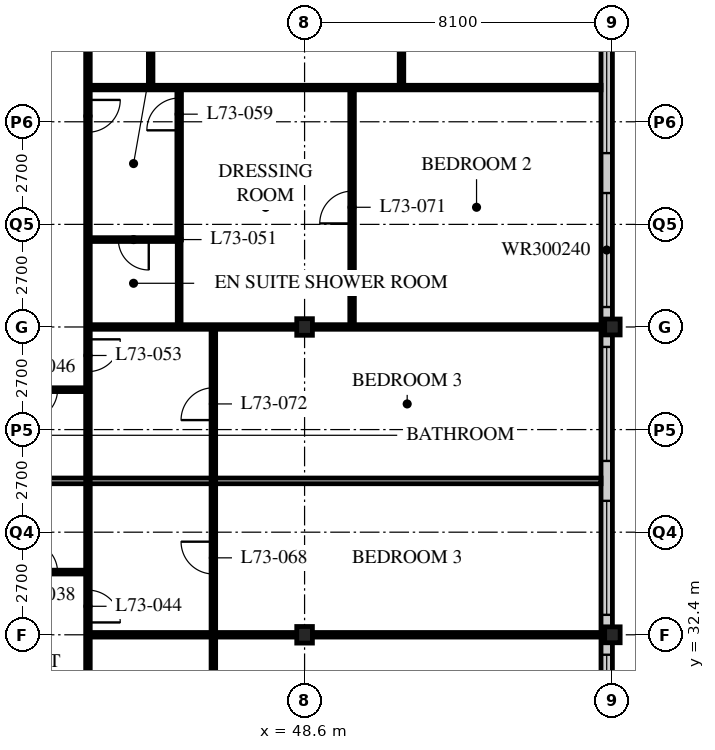
"""IFC4 building model, lengths in metres.
Left out: names, types, materials, properties, quantities, classifications, styles, units other than length and angle.
Written with IfcOpenShell. Run it as: python <this file> out.ifc"""

import sys

from ifc_helpers import new_model, si_unit, direction, frame, frame_2d, origin, origin_2d, place, context, subcontext, project, spatial, rectangle, i_section, extrude, element, fill, save


model = new_model("IFC4")
c1 = context("Model", 3, precision=1e-05, world=origin(), true_north=direction((0.0, 1.0)))
c2 = subcontext(c1, "Body", "Model", "MODEL_VIEW")
j1 = project(units=[si_unit("LENGTHUNIT", "METRE"), si_unit("PLANEANGLEUNIT", "RADIAN")], contexts=[c1])
p1 = place(None, origin())
s1 = spatial("IfcSite", under=j1, at=p1, CompositionType="ELEMENT")
p2 = place(p1, origin())
s2 = spatial("IfcBuilding", under=s1, at=p2, CompositionType="ELEMENT")
p3 = place(p2, frame((0.0, 0.0, 285.3)))
s3 = spatial("IfcBuildingStorey", under=s2, at=p3, CompositionType="ELEMENT", Elevation=285.3)
for number, where, z_axis, x_axis in (
    (1, (48.6, 32.4, 0.0), (0.0, 0.0, 1.0), (1.0, 0.0, 0.0)),
    (2, (48.6, 40.5, 0.0), (0.0, 0.0, 1.0), (1.0, 0.0, 0.0)),
):
    element("IfcColumn", number, at=place(p3, frame(where, z_axis=z_axis, x_axis=x_axis)), inside=s3, PredefinedType="COLUMN", context=c2, shape_type="SweptSolid", body=[
        extrude(i_section(OverallWidth=0.412, OverallDepth=0.437, WebThickness=0.036, FlangeThickness=0.058, FilletRadius=0.015, at=origin_2d()), origin(), (0.0, 0.0, 1.0), 3.9),
    ])
for number, where, z_axis, x_axis in (
    (3, (56.7, 32.4, 0.0), (0.0, 0.0, 1.0), (1.0, 0.0, 0.0)),
    (4, (56.7, 40.5, 0.0), (0.0, 0.0, 1.0), (1.0, 0.0, 0.0)),
):
    element("IfcColumn", number, at=place(p3, frame(where, z_axis=z_axis, x_axis=x_axis)), inside=s3, PredefinedType="COLUMN", context=c2, shape_type="SweptSolid", body=[
        extrude(i_section(OverallWidth=0.407, OverallDepth=0.419, WebThickness=0.031, FlangeThickness=0.049, FilletRadius=0.015, at=origin_2d()), origin(), (0.0, 0.0, 1.0), 3.9),
    ])
p4 = place(p3, frame((56.55, 24.6, 0.0), z_axis=(0.0, 0.0, 1.0), x_axis=(0.0, 1.0, 0.0)))
e5 = element("IfcWall", 5, at=p4, inside=s3, PredefinedType="SOLIDWALL", context=c2, shape_type="SweptSolid", body=[
    extrude(rectangle(XDim=32.1, YDim=0.3, at=frame_2d((16.05, 0.0))), origin(), (0.0, 0.0, 1.0), 3.69),
])
p5 = place(p4, frame((0.225, 0.0, 0.6)))
e6 = element("IfcOpeningElement", 6, at=p5, cuts=e5, PredefinedType="OPENING", context=c2, shape_type="SweptSolid", body=[
    extrude(rectangle(XDim=3.0, YDim=2.4, at=frame_2d((1.5, 1.2))), frame((0.0, 0.16, 0.0), z_axis=(0.0, -1.0, 0.0), x_axis=(1.0, 0.0, 0.0)), (0.0, 0.0, 1.0), 0.32),
])
p6 = place(p4, frame((4.275, 0.0, 0.6)))
e7 = element("IfcOpeningElement", 7, at=p6, cuts=e5, PredefinedType="OPENING", context=c2, shape_type="SweptSolid", body=[
    extrude(rectangle(XDim=3.0, YDim=2.4, at=frame_2d((1.5, 1.2))), frame((0.0, 0.16, 0.0), z_axis=(0.0, -1.0, 0.0), x_axis=(1.0, 0.0, 0.0)), (0.0, 0.0, 1.0), 0.32),
])
p7 = place(p4, frame((8.325, 0.0, 0.6)))
e8 = element("IfcOpeningElement", 8, at=p7, cuts=e5, PredefinedType="OPENING", context=c2, shape_type="SweptSolid", body=[
    extrude(rectangle(XDim=3.0, YDim=2.4, at=frame_2d((1.5, 1.2))), frame((0.0, 0.16, 0.0), z_axis=(0.0, -1.0, 0.0), x_axis=(1.0, 0.0, 0.0)), (0.0, 0.0, 1.0), 0.32),
])
p8 = place(p4, frame((12.375, 0.0, 0.6)))
e9 = element("IfcOpeningElement", 9, at=p8, cuts=e5, PredefinedType="OPENING", context=c2, shape_type="SweptSolid", body=[
    extrude(rectangle(XDim=3.0, YDim=2.4, at=frame_2d((1.5, 1.2))), frame((0.0, 0.16, 0.0), z_axis=(0.0, -1.0, 0.0), x_axis=(1.0, 0.0, 0.0)), (0.0, 0.0, 1.0), 0.32),
])
p9 = place(p4, frame((16.425, 0.0, 0.6)))
e10 = element("IfcOpeningElement", 10, at=p9, cuts=e5, PredefinedType="OPENING", context=c2, shape_type="SweptSolid", body=[
    extrude(rectangle(XDim=3.0, YDim=2.4, at=frame_2d((1.5, 1.2))), frame((0.0, 0.16, 0.0), z_axis=(0.0, -1.0, 0.0), x_axis=(1.0, 0.0, 0.0)), (0.0, 0.0, 1.0), 0.32),
])
p10 = place(p4, frame((20.475, 0.0, 0.6)))
e11 = element("IfcOpeningElement", 11, at=p10, cuts=e5, PredefinedType="OPENING", context=c2, shape_type="SweptSolid", body=[
    extrude(rectangle(XDim=3.0, YDim=2.4, at=frame_2d((1.5, 1.2))), frame((0.0, 0.16, 0.0), z_axis=(0.0, -1.0, 0.0), x_axis=(1.0, 0.0, 0.0)), (0.0, 0.0, 1.0), 0.32),
])
p11 = place(p4, frame((24.525, 0.0, 0.6)))
e12 = element("IfcOpeningElement", 12, at=p11, cuts=e5, PredefinedType="OPENING", context=c2, shape_type="SweptSolid", body=[
    extrude(rectangle(XDim=3.0, YDim=2.4, at=frame_2d((1.5, 1.2))), frame((0.0, 0.16, 0.0), z_axis=(0.0, -1.0, 0.0), x_axis=(1.0, 0.0, 0.0)), (0.0, 0.0, 1.0), 0.32),
])
p12 = place(p4, frame((28.575, 0.0, 0.6)))
e13 = element("IfcOpeningElement", 13, at=p12, cuts=e5, PredefinedType="OPENING", context=c2, shape_type="SweptSolid", body=[
    extrude(rectangle(XDim=3.0, YDim=2.4, at=frame_2d((1.5, 1.2))), frame((0.0, 0.16, 0.0), z_axis=(0.0, -1.0, 0.0), x_axis=(1.0, 0.0, 0.0)), (0.0, 0.0, 1.0), 0.32),
])
p13 = place(p3, frame((40.5, 34.05, 0.0), z_axis=(0.0, 0.0, 1.0), x_axis=(1.0, 0.0, 0.0)))
e14 = element("IfcWall", 14, at=p13, inside=s3, PredefinedType="PARTITIONING", context=c2, shape_type="SweptSolid", body=[
    extrude(rectangle(XDim=2.4, YDim=0.1, at=frame_2d((1.2, 0.0))), origin(), (0.0, 0.0, 1.0), 3.69),
])
p14 = place(p13, frame((0.8, 0.0, 0.0)))
e15 = element("IfcOpeningElement", 15, at=p14, cuts=e14, PredefinedType="OPENING", context=c2, shape_type="SweptSolid", body=[
    extrude(rectangle(XDim=0.8, YDim=2.1, at=frame_2d((0.4, 1.05))), frame((0.0, 0.06, 0.0), z_axis=(0.0, -1.0, 0.0), x_axis=(1.0, 0.0, 0.0)), (0.0, 0.0, 1.0), 0.12),
])
p15 = place(p3, frame((42.9, 22.5, 0.0), z_axis=(0.0, 0.0, 1.0), x_axis=(0.0, 1.0, 0.0)))
e16 = element("IfcWall", 16, at=p15, inside=s3, PredefinedType="PARTITIONING", context=c2, shape_type="SweptSolid", body=[
    extrude(rectangle(XDim=13.95, YDim=0.12, at=frame_2d((6.975, 0.0))), origin(), (0.0, 0.0, 1.0), 3.69),
])
p16 = place(p15, frame((2.125, 0.0, 0.0)))
e17 = element("IfcOpeningElement", 17, at=p16, cuts=e16, PredefinedType="OPENING", context=c2, shape_type="SweptSolid", body=[
    extrude(rectangle(XDim=0.85, YDim=2.1, at=frame_2d((0.425, 1.05))), frame((0.0, 0.07, 0.0), z_axis=(0.0, -1.0, 0.0), x_axis=(1.0, 0.0, 0.0)), (0.0, 0.0, 1.0), 0.14),
])
p17 = place(p15, frame((6.175, 0.0, 0.0)))
e18 = element("IfcOpeningElement", 18, at=p17, cuts=e16, PredefinedType="OPENING", context=c2, shape_type="SweptSolid", body=[
    extrude(rectangle(XDim=0.85, YDim=2.1, at=frame_2d((0.425, 1.05))), frame((0.0, 0.07, 0.0), z_axis=(0.0, -1.0, 0.0), x_axis=(1.0, 0.0, 0.0)), (0.0, 0.0, 1.0), 0.14),
])
p18 = place(p15, frame((10.225, 0.0, 0.0)))
e19 = element("IfcOpeningElement", 19, at=p18, cuts=e16, PredefinedType="OPENING", context=c2, shape_type="SweptSolid", body=[
    extrude(rectangle(XDim=0.85, YDim=2.1, at=frame_2d((0.425, 1.05))), frame((0.0, 0.07, 0.0), z_axis=(0.0, -1.0, 0.0), x_axis=(1.0, 0.0, 0.0)), (0.0, 0.0, 1.0), 0.14),
])
p19 = place(p3, frame((40.5, 36.45, 0.0), z_axis=(0.0, 0.0, 1.0), x_axis=(1.0, 0.0, 0.0)))
e20 = element("IfcWall", 20, at=p19, inside=s3, PredefinedType="PARTITIONING", context=c2, shape_type="SweptSolid", body=[
    extrude(rectangle(XDim=15.9, YDim=0.15, at=frame_2d((7.95, 0.0))), origin(), (0.0, 0.0, 1.0), 3.69),
])
p20 = place(p3, frame((42.9, 32.4, 0.0), z_axis=(0.0, 0.0, 1.0), x_axis=(1.0, 0.0, 0.0)))
e21 = element("IfcWall", 21, at=p20, inside=s3, PredefinedType="PARTITIONING", context=c2, shape_type="SweptSolid", body=[
    extrude(rectangle(XDim=13.5, YDim=0.12, at=frame_2d((6.75, 0.0))), origin(), (0.0, 0.0, 1.0), 3.078),
])
p21 = place(p3, frame((40.5, 38.85, 0.0), z_axis=(0.0, 0.0, 1.0), x_axis=(1.0, 0.0, 0.0)))
e22 = element("IfcWall", 22, at=p21, inside=s3, PredefinedType="PARTITIONING", context=c2, shape_type="SweptSolid", body=[
    extrude(rectangle(XDim=2.4, YDim=0.1, at=frame_2d((1.2, 0.0))), origin(), (0.0, 0.0, 1.0), 3.69),
])
p22 = place(p21, frame((0.8, 0.0, 0.0)))
e23 = element("IfcOpeningElement", 23, at=p22, cuts=e22, PredefinedType="OPENING", context=c2, shape_type="SweptSolid", body=[
    extrude(rectangle(XDim=0.8, YDim=2.1, at=frame_2d((0.4, 1.05))), frame((0.0, 0.06, 0.0), z_axis=(0.0, -1.0, 0.0), x_axis=(1.0, 0.0, 0.0)), (0.0, 0.0, 1.0), 0.12),
])
p23 = place(p3, frame((42.9, 48.6, 0.0), z_axis=(0.0, 0.0, 1.0), x_axis=(0.0, -1.0, 0.0)))
e24 = element("IfcWall", 24, at=p23, inside=s3, PredefinedType="PARTITIONING", context=c2, shape_type="SweptSolid", body=[
    extrude(rectangle(XDim=12.15, YDim=0.12, at=frame_2d((6.075, 0.0))), origin(), (0.0, 0.0, 1.0), 3.69),
])
p24 = place(p23, frame((2.125, 0.0, 0.0)))
e25 = element("IfcOpeningElement", 25, at=p24, cuts=e24, PredefinedType="OPENING", context=c2, shape_type="SweptSolid", body=[
    extrude(rectangle(XDim=0.85, YDim=2.1, at=frame_2d((0.425, 1.05))), frame((0.0, 0.07, 0.0), z_axis=(0.0, -1.0, 0.0), x_axis=(1.0, 0.0, 0.0)), (0.0, 0.0, 1.0), 0.14),
])
p25 = place(p23, frame((8.425, 0.0, 0.0)))
e26 = element("IfcOpeningElement", 26, at=p25, cuts=e24, PredefinedType="OPENING", context=c2, shape_type="SweptSolid", body=[
    extrude(rectangle(XDim=0.85, YDim=2.1, at=frame_2d((0.425, 1.05))), frame((0.0, 0.07, 0.0), z_axis=(0.0, -1.0, 0.0), x_axis=(1.0, 0.0, 0.0)), (0.0, 0.0, 1.0), 0.14),
])
p26 = place(p3, frame((42.9, 46.8, 0.0), z_axis=(0.0, 0.0, 1.0), x_axis=(1.0, 0.0, 0.0)))
e27 = element("IfcWall", 27, at=p26, inside=s3, PredefinedType="PARTITIONING", context=c2, shape_type="SweptSolid", body=[
    extrude(rectangle(XDim=13.5, YDim=0.12, at=frame_2d((6.75, 0.0))), origin(), (0.0, 0.0, 1.0), 3.69),
])
p27 = place(p3, frame((44.55, 64.5, 0.0), z_axis=(0.0, 0.0, 1.0), x_axis=(0.0, -1.0, 0.0)))
e28 = element("IfcWall", 28, at=p27, inside=s3, PredefinedType="PARTITIONING", context=c2, shape_type="SweptSolid", body=[
    extrude(rectangle(XDim=17.7, YDim=0.12, at=frame_2d((8.85, 0.0))), origin(), (0.0, 0.0, 1.0), 3.69),
])
p28 = place(p27, frame((12.475, 0.0, 0.0)))
e29 = element("IfcOpeningElement", 29, at=p28, cuts=e28, PredefinedType="OPENING", context=c2, shape_type="SweptSolid", body=[
    extrude(rectangle(XDim=0.85, YDim=2.1, at=frame_2d((0.425, 1.05))), frame((0.0, 0.07, 0.0), z_axis=(0.0, -1.0, 0.0), x_axis=(1.0, 0.0, 0.0)), (0.0, 0.0, 1.0), 0.14),
])
p29 = place(p27, frame((4.525, 0.0, 0.0)))
e30 = element("IfcOpeningElement", 30, at=p29, cuts=e28, PredefinedType="OPENING", context=c2, shape_type="SweptSolid", body=[
    extrude(rectangle(XDim=0.85, YDim=2.1, at=frame_2d((0.425, 1.05))), frame((0.0, 0.07, 0.0), z_axis=(0.0, -1.0, 0.0), x_axis=(1.0, 0.0, 0.0)), (0.0, 0.0, 1.0), 0.14),
])
p30 = place(p3, frame((42.9, 42.8, 0.0), z_axis=(0.0, 0.0, 1.0), x_axis=(1.0, 0.0, 0.0)))
e31 = element("IfcWall", 31, at=p30, inside=s3, PredefinedType="PARTITIONING", context=c2, shape_type="SweptSolid", body=[
    extrude(rectangle(XDim=2.4, YDim=0.1, at=frame_2d((1.2, 0.0))), origin(), (0.0, 0.0, 1.0), 3.69),
])
p31 = place(p30, frame((0.8, 0.0, 0.0)))
e32 = element("IfcOpeningElement", 32, at=p31, cuts=e31, PredefinedType="OPENING", context=c2, shape_type="SweptSolid", body=[
    extrude(rectangle(XDim=0.8, YDim=2.1, at=frame_2d((0.4, 1.05))), frame((0.0, 0.06, 0.0), z_axis=(0.0, -1.0, 0.0), x_axis=(1.0, 0.0, 0.0)), (0.0, 0.0, 1.0), 0.12),
])
p32 = place(p3, frame((45.3, 42.8, 0.0), z_axis=(0.0, 0.0, 1.0), x_axis=(0.0, -1.0, 0.0)))
e33 = element("IfcWall", 33, at=p32, inside=s3, PredefinedType="PARTITIONING", context=c2, shape_type="SweptSolid", body=[
    extrude(rectangle(XDim=2.3, YDim=0.1, at=frame_2d((1.15, 0.0))), origin(), (0.0, 0.0, 1.0), 3.69),
])
p33 = place(p3, frame((42.9, 40.5, 0.0), z_axis=(0.0, 0.0, 1.0), x_axis=(1.0, 0.0, 0.0)))
e34 = element("IfcWall", 34, at=p33, inside=s3, PredefinedType="PARTITIONING", context=c2, shape_type="SweptSolid", body=[
    extrude(rectangle(XDim=13.5, YDim=0.12, at=frame_2d((6.75, 0.0))), origin(), (0.0, 0.0, 1.0), 3.078),
])
p34 = place(p3, frame((45.3, 46.8, 0.0), z_axis=(0.0, 0.0, 1.0), x_axis=(0.0, -1.0, 0.0)))
e35 = element("IfcWall", 35, at=p34, inside=s3, PredefinedType="PARTITIONING", context=c2, shape_type="SweptSolid", body=[
    extrude(rectangle(XDim=4.01, YDim=0.12, at=frame_2d((2.005, 0.0))), origin(), (0.0, 0.0, 1.0), 3.69),
])
p35 = place(p34, frame((0.275, 0.0, 0.0)))
e36 = element("IfcOpeningElement", 36, at=p35, cuts=e35, PredefinedType="OPENING", context=c2, shape_type="SweptSolid", body=[
    extrude(rectangle(XDim=0.85, YDim=2.1, at=frame_2d((0.425, 1.05))), frame((0.0, 0.07, 0.0), z_axis=(0.0, -1.0, 0.0), x_axis=(1.0, 0.0, 0.0)), (0.0, 0.0, 1.0), 0.14),
])
p36 = place(p3, frame((46.2, 28.35, 0.0), z_axis=(0.0, 0.0, 1.0), x_axis=(0.0, 1.0, 0.0)))
e37 = element("IfcWall", 37, at=p36, inside=s3, PredefinedType="PARTITIONING", context=c2, shape_type="SweptSolid", body=[
    extrude(rectangle(XDim=12.15, YDim=0.12, at=frame_2d((6.075, 0.0))), origin(), (0.0, 0.0, 1.0), 3.69),
])
p37 = place(p36, frame((1.6, 0.0, 0.0)))
e38 = element("IfcOpeningElement", 38, at=p37, cuts=e37, PredefinedType="OPENING", context=c2, shape_type="SweptSolid", body=[
    extrude(rectangle(XDim=0.85, YDim=2.1, at=frame_2d((0.425, 1.05))), frame((0.0, 0.07, 0.0), z_axis=(0.0, -1.0, 0.0), x_axis=(1.0, 0.0, 0.0)), (0.0, 0.0, 1.0), 0.14),
])
p38 = place(p36, frame((5.65, 0.0, 0.0)))
e39 = element("IfcOpeningElement", 39, at=p38, cuts=e37, PredefinedType="OPENING", context=c2, shape_type="SweptSolid", body=[
    extrude(rectangle(XDim=0.85, YDim=2.1, at=frame_2d((0.425, 1.05))), frame((0.0, 0.07, 0.0), z_axis=(0.0, -1.0, 0.0), x_axis=(1.0, 0.0, 0.0)), (0.0, 0.0, 1.0), 0.14),
])
p39 = place(p36, frame((9.7, 0.0, 0.0)))
e40 = element("IfcOpeningElement", 40, at=p39, cuts=e37, PredefinedType="OPENING", context=c2, shape_type="SweptSolid", body=[
    extrude(rectangle(XDim=0.85, YDim=2.1, at=frame_2d((0.425, 1.05))), frame((0.0, 0.07, 0.0), z_axis=(0.0, -1.0, 0.0), x_axis=(1.0, 0.0, 0.0)), (0.0, 0.0, 1.0), 0.14),
])
p40 = place(p3, frame((51.15, 46.8, 0.0), z_axis=(0.0, 0.0, 1.0), x_axis=(0.0, 1.0, 0.0)))
e41 = element("IfcWall", 41, at=p40, inside=s3, PredefinedType="PARTITIONING", context=c2, shape_type="SweptSolid", body=[
    extrude(rectangle(XDim=7.8, YDim=0.12, at=frame_2d((3.9, 0.0))), origin(), (0.0, 0.0, 1.0), 3.69),
])
p41 = place(p40, frame((3.475, 0.0, 0.0)))
e42 = element("IfcOpeningElement", 42, at=p41, cuts=e41, PredefinedType="OPENING", context=c2, shape_type="SweptSolid", body=[
    extrude(rectangle(XDim=0.85, YDim=2.1, at=frame_2d((0.425, 1.05))), frame((0.0, 0.07, 0.0), z_axis=(0.0, -1.0, 0.0), x_axis=(1.0, 0.0, 0.0)), (0.0, 0.0, 1.0), 0.14),
])
p42 = place(p3, frame((49.85, 40.5, 0.0), z_axis=(0.0, 0.0, 1.0), x_axis=(0.0, 1.0, 0.0)))
e43 = element("IfcWall", 43, at=p42, inside=s3, PredefinedType="PARTITIONING", context=c2, shape_type="SweptSolid", body=[
    extrude(rectangle(XDim=6.3, YDim=0.12, at=frame_2d((3.15, 0.0))), origin(), (0.0, 0.0, 1.0), 3.69),
])
p43 = place(p42, frame((2.725, 0.0, 0.0)))
e44 = element("IfcOpeningElement", 44, at=p43, cuts=e43, PredefinedType="OPENING", context=c2, shape_type="SweptSolid", body=[
    extrude(rectangle(XDim=0.85, YDim=2.1, at=frame_2d((0.425, 1.05))), frame((0.0, 0.07, 0.0), z_axis=(0.0, -1.0, 0.0), x_axis=(1.0, 0.0, 0.0)), (0.0, 0.0, 1.0), 0.14),
])
p44 = place(p6, origin())
e45 = element("IfcWindow", 45, at=p44, inside=s3, PartitioningType="SINGLE_PANEL", PredefinedType="WINDOW", context=c2, shape_type="SweptSolid", body=[
    extrude(rectangle(XDim=3.0, YDim=2.4, at=frame_2d((1.5, 1.2))), frame((0.0, 0.03, 0.0), z_axis=(0.0, -1.0, 0.0), x_axis=(1.0, 0.0, 0.0)), (0.0, 0.0, 1.0), 0.06),
])
fill(e7, e45)
p45 = place(p7, origin())
e46 = element("IfcWindow", 46, at=p45, inside=s3, PartitioningType="SINGLE_PANEL", PredefinedType="WINDOW", context=c2, shape_type="SweptSolid", body=[
    extrude(rectangle(XDim=3.0, YDim=2.4, at=frame_2d((1.5, 1.2))), frame((0.0, 0.03, 0.0), z_axis=(0.0, -1.0, 0.0), x_axis=(1.0, 0.0, 0.0)), (0.0, 0.0, 1.0), 0.06),
])
fill(e8, e46)
p46 = place(p8, origin())
e47 = element("IfcWindow", 47, at=p46, inside=s3, PartitioningType="SINGLE_PANEL", PredefinedType="WINDOW", context=c2, shape_type="SweptSolid", body=[
    extrude(rectangle(XDim=3.0, YDim=2.4, at=frame_2d((1.5, 1.2))), frame((0.0, 0.03, 0.0), z_axis=(0.0, -1.0, 0.0), x_axis=(1.0, 0.0, 0.0)), (0.0, 0.0, 1.0), 0.06),
])
fill(e9, e47)
p47 = place(p9, origin())
e48 = element("IfcWindow", 48, at=p47, inside=s3, PartitioningType="SINGLE_PANEL", PredefinedType="WINDOW", context=c2, shape_type="SweptSolid", body=[
    extrude(rectangle(XDim=3.0, YDim=2.4, at=frame_2d((1.5, 1.2))), frame((0.0, 0.03, 0.0), z_axis=(0.0, -1.0, 0.0), x_axis=(1.0, 0.0, 0.0)), (0.0, 0.0, 1.0), 0.06),
])
fill(e10, e48)
p48 = place(p10, origin())
e49 = element("IfcWindow", 49, at=p48, inside=s3, PartitioningType="SINGLE_PANEL", PredefinedType="WINDOW", context=c2, shape_type="SweptSolid", body=[
    extrude(rectangle(XDim=3.0, YDim=2.4, at=frame_2d((1.5, 1.2))), frame((0.0, 0.03, 0.0), z_axis=(0.0, -1.0, 0.0), x_axis=(1.0, 0.0, 0.0)), (0.0, 0.0, 1.0), 0.06),
])
fill(e11, e49)
p49 = place(p14, origin())
e50 = element("IfcDoor", 50, at=p49, inside=s3, OperationType="SINGLE_SWING_LEFT", PredefinedType="DOOR", context=c2, shape_type="SweptSolid", body=[
    extrude(rectangle(XDim=0.8, YDim=2.1, at=frame_2d((0.4, 1.05))), frame((0.0, 0.025, 0.0), z_axis=(0.0, -1.0, 0.0), x_axis=(1.0, 0.0, 0.0)), (0.0, 0.0, 1.0), 0.05),
])
fill(e15, e50)
p50 = place(p18, origin())
e51 = element("IfcDoor", 51, at=p50, inside=s3, OperationType="SINGLE_SWING_RIGHT", PredefinedType="DOOR", context=c2, shape_type="SweptSolid", body=[
    extrude(rectangle(XDim=0.85, YDim=2.1, at=frame_2d((0.425, 1.05))), frame((0.0, 0.025, 0.0), z_axis=(0.0, -1.0, 0.0), x_axis=(1.0, 0.0, 0.0)), (0.0, 0.0, 1.0), 0.05),
])
fill(e19, e51)
p51 = place(p22, origin())
e52 = element("IfcDoor", 52, at=p51, inside=s3, OperationType="SINGLE_SWING_RIGHT", PredefinedType="DOOR", context=c2, shape_type="SweptSolid", body=[
    extrude(rectangle(XDim=0.8, YDim=2.1, at=frame_2d((0.4, 1.05))), frame((0.0, 0.025, 0.0), z_axis=(0.0, -1.0, 0.0), x_axis=(1.0, 0.0, 0.0)), (0.0, 0.0, 1.0), 0.05),
])
fill(e23, e52)
p52 = place(p31, origin())
e53 = element("IfcDoor", 53, at=p52, inside=s3, OperationType="SINGLE_SWING_LEFT", PredefinedType="DOOR", context=c2, shape_type="SweptSolid", body=[
    extrude(rectangle(XDim=0.8, YDim=2.1, at=frame_2d((0.4, 1.05))), frame((0.0, 0.025, 0.0), z_axis=(0.0, -1.0, 0.0), x_axis=(1.0, 0.0, 0.0)), (0.0, 0.0, 1.0), 0.05),
])
fill(e32, e53)
p53 = place(p24, origin())
e54 = element("IfcDoor", 54, at=p53, inside=s3, OperationType="SINGLE_SWING_LEFT", PredefinedType="DOOR", context=c2, shape_type="SweptSolid", body=[
    extrude(rectangle(XDim=0.85, YDim=2.1, at=frame_2d((0.425, 1.05))), frame((0.0, 0.025, 0.0), z_axis=(0.0, -1.0, 0.0), x_axis=(1.0, 0.0, 0.0)), (0.0, 0.0, 1.0), 0.05),
])
fill(e25, e54)
p54 = place(p25, origin())
e55 = element("IfcDoor", 55, at=p54, inside=s3, OperationType="SINGLE_SWING_LEFT", PredefinedType="DOOR", context=c2, shape_type="SweptSolid", body=[
    extrude(rectangle(XDim=0.85, YDim=2.1, at=frame_2d((0.425, 1.05))), frame((0.0, 0.025, 0.0), z_axis=(0.0, -1.0, 0.0), x_axis=(1.0, 0.0, 0.0)), (0.0, 0.0, 1.0), 0.05),
])
fill(e26, e55)
p55 = place(p35, origin())
e56 = element("IfcDoor", 56, at=p55, inside=s3, OperationType="SINGLE_SWING_LEFT", PredefinedType="DOOR", context=c2, shape_type="SweptSolid", body=[
    extrude(rectangle(XDim=0.85, YDim=2.1, at=frame_2d((0.425, 1.05))), frame((0.0, 0.025, 0.0), z_axis=(0.0, -1.0, 0.0), x_axis=(1.0, 0.0, 0.0)), (0.0, 0.0, 1.0), 0.05),
])
fill(e36, e56)
p56 = place(p38, origin())
e57 = element("IfcDoor", 57, at=p56, inside=s3, OperationType="SINGLE_SWING_RIGHT", PredefinedType="DOOR", context=c2, shape_type="SweptSolid", body=[
    extrude(rectangle(XDim=0.85, YDim=2.1, at=frame_2d((0.425, 1.05))), frame((0.0, 0.025, 0.0), z_axis=(0.0, -1.0, 0.0), x_axis=(1.0, 0.0, 0.0)), (0.0, 0.0, 1.0), 0.05),
])
fill(e39, e57)
p57 = place(p43, origin())
e58 = element("IfcDoor", 58, at=p57, inside=s3, OperationType="SINGLE_SWING_LEFT", PredefinedType="DOOR", context=c2, shape_type="SweptSolid", body=[
    extrude(rectangle(XDim=0.85, YDim=2.1, at=frame_2d((0.425, 1.05))), frame((0.0, 0.025, 0.0), z_axis=(0.0, -1.0, 0.0), x_axis=(1.0, 0.0, 0.0)), (0.0, 0.0, 1.0), 0.05),
])
fill(e44, e58)
p58 = place(p39, origin())
e59 = element("IfcDoor", 59, at=p58, inside=s3, OperationType="SINGLE_SWING_LEFT", PredefinedType="DOOR", context=c2, shape_type="SweptSolid", body=[
    extrude(rectangle(XDim=0.85, YDim=2.1, at=frame_2d((0.425, 1.05))), frame((0.0, 0.025, 0.0), z_axis=(0.0, -1.0, 0.0), x_axis=(1.0, 0.0, 0.0)), (0.0, 0.0, 1.0), 0.05),
])
fill(e40, e59)
save(model, sys.argv[1])
